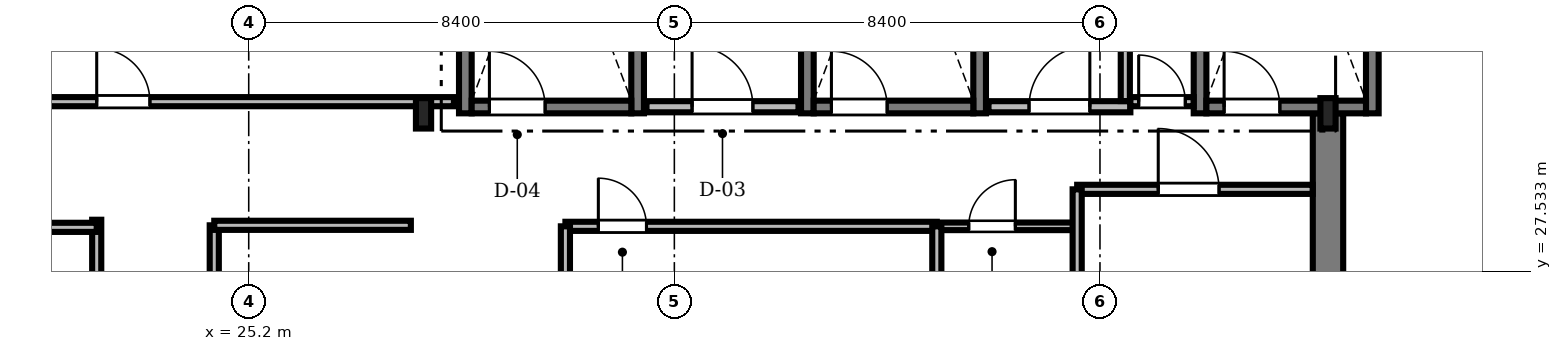
"""IFC4 building model, lengths in metres.
Left out: names, types, materials, properties, quantities, classifications, styles, units other than length and angle.
Written with IfcOpenShell. Run it as: python <this file> out.ifc"""

import sys

from ifc_helpers import new_model, si_unit, direction, frame, frame_2d, origin, origin_2d, place, context, subcontext, project, spatial, rectangle, i_section, extrude, source, transform, mapped, element, fill, save


model = new_model("IFC4")
c1 = context("Model", 3, precision=1e-05, world=origin(), true_north=direction((0.0, 1.0)))
c2 = subcontext(c1, "Body", "Model", "MODEL_VIEW")
j1 = project(units=[si_unit("LENGTHUNIT", "METRE"), si_unit("PLANEANGLEUNIT", "RADIAN")], contexts=[c1])
p1 = place(None, origin())
s1 = spatial("IfcSite", under=j1, at=p1, CompositionType="ELEMENT")
p2 = place(p1, origin())
s2 = spatial("IfcBuilding", under=s1, at=p2, CompositionType="ELEMENT")
p3 = place(p2, frame((0.0, 0.0, 246.65)))
s3 = spatial("IfcBuildingStorey", under=s2, at=p3, CompositionType="ELEMENT", Elevation=246.65)
m1 = source(origin(), c2, "Body", "SweptSolid", [
    extrude(rectangle(XDim=13.15, YDim=0.6, at=frame_2d((6.575, 0.0))), origin(), (0.0, 0.0, 1.0), 3.73),
])
p4 = place(p3, frame((46.5, 17.5, 0.0), z_axis=(0.0, 0.0, 1.0), x_axis=(0.0, 1.0, 0.0)))
e1 = element("IfcWall", 1, at=p4, inside=s3, PredefinedType="SHEAR", context=c2, shape_type="MappedRepresentation", body=[
    mapped(m1, transform((0.0, 0.0, 0.0), scale=1.0)),
])
m2 = source(origin(), c2, "Body", "SweptSolid", [
    extrude(i_section(OverallWidth=0.3, OverallDepth=0.6, WebThickness=0.015, FlangeThickness=0.03, FilletRadius=0.027, at=origin_2d()), origin(), (0.0, 0.0, 1.0), 3.73),
])
for number, where, z_axis, x_axis in (
    (2, (28.65, 30.65, 0.0), (0.0, 0.0, 1.0), (1.0, 0.0, 0.0)),
    (3, (46.5, 30.65, 0.0), (0.0, 0.0, 1.0), (1.0, 0.0, 0.0)),
):
    element("IfcColumn", number, at=place(p3, frame(where, z_axis=z_axis, x_axis=x_axis)), inside=s3, PredefinedType="COLUMN", context=c2, shape_type="MappedRepresentation", body=[
        mapped(m2, transform((0.0, 0.0, 0.0), scale=1.0)),
    ])
m3 = source(origin(), c2, "Body", "SweptSolid", [
    extrude(rectangle(XDim=9.35, YDim=0.25, at=frame_2d((4.675, 0.0))), origin(), (0.0, 0.0, 1.0), 3.75),
])
for number, where, z_axis, x_axis in (
    (4, (29.475, 30.65, 0.0), (0.0, 0.0, 1.0), (0.0, 1.0, 0.0)),
    (5, (32.875, 30.65, 0.0), (0.0, 0.0, 1.0), (0.0, 1.0, 0.0)),
):
    element("IfcWall", number, at=place(p3, frame(where, z_axis=z_axis, x_axis=x_axis)), inside=s3, PredefinedType="SOLIDWALL", context=c2, shape_type="MappedRepresentation", body=[
        mapped(m3, transform((0.0, 0.0, 0.0), scale=1.0)),
    ])
m4 = source(origin(), c2, "Body", "SweptSolid", [
    extrude(rectangle(XDim=3.15, YDim=0.25, at=frame_2d((1.575, 0.0))), origin(), (0.0, 0.0, 1.0), 3.75),
])
p5 = place(p3, frame((29.6, 30.775, 0.0), z_axis=(0.0, 0.0, 1.0), x_axis=(1.0, 0.0, 0.0)))
e6 = element("IfcWall", 6, at=p5, inside=s3, PredefinedType="SOLIDWALL", context=c2, shape_type="MappedRepresentation", body=[
    mapped(m4, transform((0.0, 0.0, 0.0), scale=1.0)),
])
m5 = source(origin(), c2, "Body", "SweptSolid", [
    extrude(rectangle(XDim=1.1, YDim=2.2, at=frame_2d((0.55, 1.1))), frame((0.0, 0.135, 0.0), z_axis=(0.0, -1.0, 0.0), x_axis=(1.0, 0.0, 0.0)), (0.0, 0.0, 1.0), 0.27),
])
p6 = place(p5, frame((0.35, 0.0, 0.0)))
e7 = element("IfcOpeningElement", 7, at=p6, cuts=e6, PredefinedType="OPENING", context=c2, shape_type="MappedRepresentation", body=[
    mapped(m5, transform((0.0, 0.0, 0.0), scale=1.0)),
])
for number, where, z_axis, x_axis in (
    (8, (36.225, 30.65, 0.0), (0.0, 0.0, 1.0), (0.0, 1.0, 0.0)),
    (9, (39.625, 30.65, 0.0), (0.0, 0.0, 1.0), (0.0, 1.0, 0.0)),
):
    element("IfcWall", number, at=place(p3, frame(where, z_axis=z_axis, x_axis=x_axis)), inside=s3, PredefinedType="SOLIDWALL", context=c2, shape_type="MappedRepresentation", body=[
        mapped(m3, transform((0.0, 0.0, 0.0), scale=1.0)),
    ])
p7 = place(p3, frame((36.35, 30.775, 0.0), z_axis=(0.0, 0.0, 1.0), x_axis=(1.0, 0.0, 0.0)))
e10 = element("IfcWall", 10, at=p7, inside=s3, PredefinedType="SOLIDWALL", context=c2, shape_type="MappedRepresentation", body=[
    mapped(m4, transform((0.0, 0.0, 0.0), scale=1.0)),
])
p8 = place(p7, frame((0.35, 0.0, 0.0)))
e11 = element("IfcOpeningElement", 11, at=p8, cuts=e10, PredefinedType="OPENING", context=c2, shape_type="MappedRepresentation", body=[
    mapped(m5, transform((0.0, 0.0, 0.0), scale=1.0)),
])
for number, where, z_axis, x_axis in (
    (12, (43.975, 30.65, 0.0), (0.0, 0.0, 1.0), (0.0, 1.0, 0.0)),
    (13, (47.375, 30.65, 0.0), (0.0, 0.0, 1.0), (0.0, 1.0, 0.0)),
):
    element("IfcWall", number, at=place(p3, frame(where, z_axis=z_axis, x_axis=x_axis)), inside=s3, PredefinedType="SOLIDWALL", context=c2, shape_type="MappedRepresentation", body=[
        mapped(m3, transform((0.0, 0.0, 0.0), scale=1.0)),
    ])
p9 = place(p3, frame((44.1, 30.775, 0.0), z_axis=(0.0, 0.0, 1.0), x_axis=(1.0, 0.0, 0.0)))
e14 = element("IfcWall", 14, at=p9, inside=s3, PredefinedType="SOLIDWALL", context=c2, shape_type="MappedRepresentation", body=[
    mapped(m4, transform((0.0, 0.0, 0.0), scale=1.0)),
])
p10 = place(p9, frame((0.35, 0.0, 0.0)))
e15 = element("IfcOpeningElement", 15, at=p10, cuts=e14, PredefinedType="OPENING", context=c2, shape_type="MappedRepresentation", body=[
    mapped(m5, transform((0.0, 0.0, 0.0), scale=1.0)),
])
m6 = source(origin(), c2, "Body", "SweptSolid", [
    extrude(rectangle(XDim=3.0, YDim=0.22, at=frame_2d((1.5, 0.0))), origin(), (0.0, 0.0, 1.0), 3.73),
])
p11 = place(p3, frame((33.05, 30.78, 0.0), z_axis=(0.0, 0.0, 1.0), x_axis=(1.0, 0.0, 0.0)))
e16 = element("IfcWall", 16, at=p11, inside=s3, PredefinedType="SOLIDWALL", context=c2, shape_type="MappedRepresentation", body=[
    mapped(m6, transform((0.0, 0.0, 0.0), scale=1.0)),
])
m7 = source(origin(), c2, "Body", "SweptSolid", [
    extrude(rectangle(XDim=1.2, YDim=2.2, at=frame_2d((0.6, 1.1))), frame((0.0, 0.12, 0.0), z_axis=(0.0, -1.0, 0.0), x_axis=(1.0, 0.0, 0.0)), (0.0, 0.0, 1.0), 0.24),
])
p12 = place(p11, frame((0.9, 0.0, 0.0)))
e17 = element("IfcOpeningElement", 17, at=p12, cuts=e16, PredefinedType="OPENING", context=c2, shape_type="MappedRepresentation", body=[
    mapped(m7, transform((0.0, 0.0, 0.0), scale=1.0)),
])
m8 = source(origin(), c2, "Body", "SweptSolid", [
    extrude(rectangle(XDim=2.8, YDim=0.22, at=frame_2d((1.4, 0.0))), origin(), (0.0, 0.0, 1.0), 3.73),
])
p13 = place(p3, frame((39.8, 30.78, 0.0), z_axis=(0.0, 0.0, 1.0), x_axis=(1.0, 0.0, 0.0)))
e18 = element("IfcWall", 18, at=p13, inside=s3, PredefinedType="SOLIDWALL", context=c2, shape_type="MappedRepresentation", body=[
    mapped(m8, transform((0.0, 0.0, 0.0), scale=1.0)),
])
p14 = place(p13, frame((0.8, 0.0, 0.0)))
e19 = element("IfcOpeningElement", 19, at=p14, cuts=e18, PredefinedType="OPENING", context=c2, shape_type="MappedRepresentation", body=[
    mapped(m7, transform((0.0, 0.0, 0.0), scale=1.0)),
])
m9 = source(origin(), c2, "Body", "SweptSolid", [
    extrude(rectangle(XDim=13.328, YDim=0.18, at=frame_2d((6.664, 0.0))), origin(), (0.0, 0.0, 1.0), 2.972),
])
p15 = place(p3, frame((15.922, 30.88, 0.0), z_axis=(0.0, 0.0, 1.0), x_axis=(1.0, 0.0, 0.0)))
e20 = element("IfcWall", 20, at=p15, inside=s3, PredefinedType="PARTITIONING", context=c2, shape_type="MappedRepresentation", body=[
    mapped(m9, transform((0.0, 0.0, 0.0), scale=1.0)),
])
m10 = source(origin(), c2, "Body", "SweptSolid", [
    extrude(rectangle(XDim=1.05, YDim=2.2, at=frame_2d((0.525, 1.1))), frame((0.0, 0.1, 0.0), z_axis=(0.0, -1.0, 0.0), x_axis=(1.0, 0.0, 0.0)), (0.0, 0.0, 1.0), 0.2),
])
p16 = place(p15, frame((6.278, 0.0, 0.0)))
e21 = element("IfcOpeningElement", 21, at=p16, cuts=e20, PredefinedType="OPENING", context=c2, shape_type="MappedRepresentation", body=[
    mapped(m10, transform((0.0, 0.0, 0.0), scale=1.0)),
])
m11 = source(origin(), c2, "Body", "SweptSolid", [
    extrude(rectangle(XDim=11.94, YDim=0.18, at=frame_2d((5.97, 0.0))), origin(), (0.0, 0.0, 1.0), 3.172),
])
p17 = place(p3, frame((24.52, 16.5, 0.0), z_axis=(0.0, 0.0, 1.0), x_axis=(0.0, 1.0, 0.0)))
e22 = element("IfcWall", 22, at=p17, inside=s3, PredefinedType="PARTITIONING", context=c2, shape_type="MappedRepresentation", body=[
    mapped(m11, transform((0.0, 0.0, 0.0), scale=1.0)),
])
p18 = place(p17, frame((4.5, 0.0, 0.0)))
e23 = element("IfcOpeningElement", 23, at=p18, cuts=e22, PredefinedType="OPENING", context=c2, shape_type="MappedRepresentation", body=[
    mapped(m10, transform((0.0, 0.0, 0.0), scale=1.0)),
])
m12 = source(origin(), c2, "Body", "SweptSolid", [
    extrude(rectangle(XDim=7.33, YDim=0.18, at=frame_2d((3.665, 0.0))), origin(), (0.0, 0.0, 1.0), 3.362),
])
p19 = place(p3, frame((31.45, 28.42, 0.0), z_axis=(0.0, 0.0, 1.0), x_axis=(1.0, 0.0, 0.0)))
e24 = element("IfcWall", 24, at=p19, inside=s3, PredefinedType="PARTITIONING", context=c2, shape_type="MappedRepresentation", body=[
    mapped(m12, transform((0.0, 0.0, 0.0), scale=1.0)),
])
m13 = source(origin(), c2, "Body", "SweptSolid", [
    extrude(rectangle(XDim=0.95, YDim=2.15, at=frame_2d((0.475, 1.075))), frame((0.0, 0.1, 0.0), z_axis=(0.0, -1.0, 0.0), x_axis=(1.0, 0.0, 0.0)), (0.0, 0.0, 1.0), 0.2),
])
p20 = place(p19, frame((0.65, 0.0, 0.0)))
e25 = element("IfcOpeningElement", 25, at=p20, cuts=e24, PredefinedType="OPENING", context=c2, shape_type="MappedRepresentation", body=[
    mapped(m13, transform((0.0, 0.0, 0.0), scale=1.0)),
])
m14 = source(origin(), c2, "Body", "SweptSolid", [
    extrude(rectangle(XDim=4.648, YDim=0.18, at=frame_2d((2.324, 0.0))), origin(), (0.0, 0.0, 1.0), 3.362),
])
p21 = place(p3, frame((41.55, 29.15, 0.0), z_axis=(0.0, 0.0, 1.0), x_axis=(1.0, 0.0, 0.0)))
e26 = element("IfcWall", 26, at=p21, inside=s3, PredefinedType="PARTITIONING", context=c2, shape_type="MappedRepresentation", body=[
    mapped(m14, transform((0.0, 0.0, 0.0), scale=1.0)),
])
m15 = source(origin(), c2, "Body", "SweptSolid", [
    extrude(rectangle(XDim=1.2, YDim=2.2, at=frame_2d((0.6, 1.1))), frame((0.0, 0.1, 0.0), z_axis=(0.0, -1.0, 0.0), x_axis=(1.0, 0.0, 0.0)), (0.0, 0.0, 1.0), 0.2),
])
p22 = place(p21, frame((1.6, 0.0, 0.0)))
e27 = element("IfcOpeningElement", 27, at=p22, cuts=e26, PredefinedType="OPENING", context=c2, shape_type="MappedRepresentation", body=[
    mapped(m15, transform((0.0, 0.0, 0.0), scale=1.0)),
])
m16 = source(origin(), c2, "Body", "SweptSolid", [
    extrude(rectangle(XDim=2.74, YDim=0.15, at=frame_2d((1.37, 0.0))), origin(), (0.0, 0.0, 1.0), 3.73),
])
p23 = place(p3, frame((38.78, 28.42, 0.0), z_axis=(0.0, 0.0, 1.0), x_axis=(1.0, 0.0, 0.0)))
e28 = element("IfcWall", 28, at=p23, inside=s3, PredefinedType="PARTITIONING", context=c2, shape_type="MappedRepresentation", body=[
    mapped(m16, transform((0.0, 0.0, 0.0), scale=1.0)),
])
m17 = source(origin(), c2, "Body", "SweptSolid", [
    extrude(rectangle(XDim=0.92, YDim=2.1, at=frame_2d((0.46, 1.05))), frame((0.0, 0.085, 0.0), z_axis=(0.0, -1.0, 0.0), x_axis=(1.0, 0.0, 0.0)), (0.0, 0.0, 1.0), 0.17),
])
p24 = place(p23, frame((0.63, 0.0, 0.0)))
e29 = element("IfcOpeningElement", 29, at=p24, cuts=e28, PredefinedType="OPENING", context=c2, shape_type="MappedRepresentation", body=[
    mapped(m17, transform((0.0, 0.0, 0.0), scale=1.0)),
])
m18 = source(origin(), c2, "Body", "SweptSolid", [
    extrude(rectangle(XDim=1.248, YDim=0.18, at=frame_2d((0.624, 0.0))), origin(), (0.0, 0.0, 1.0), 3.73),
])
p25 = place(p3, frame((42.6, 30.88, 0.0), z_axis=(0.0, 0.0, 1.0), x_axis=(1.0, 0.0, 0.0)))
e30 = element("IfcWall", 30, at=p25, inside=s3, PredefinedType="PARTITIONING", context=c2, shape_type="MappedRepresentation", body=[
    mapped(m18, transform((0.0, 0.0, 0.0), scale=1.0)),
])
m19 = source(origin(), c2, "Body", "SweptSolid", [
    extrude(rectangle(XDim=0.92, YDim=2.1, at=frame_2d((0.46, 1.05))), frame((0.0, 0.1, 0.0), z_axis=(0.0, -1.0, 0.0), x_axis=(1.0, 0.0, 0.0)), (0.0, 0.0, 1.0), 0.2),
])
p26 = place(p25, frame((0.164, 0.0, 0.0)))
e31 = element("IfcOpeningElement", 31, at=p26, cuts=e30, PredefinedType="OPENING", context=c2, shape_type="MappedRepresentation", body=[
    mapped(m19, transform((0.0, 0.0, 0.0), scale=1.0)),
])
m20 = source(origin(), c2, "Body", "SweptSolid", [
    extrude(rectangle(XDim=15.04, YDim=0.18, at=frame_2d((7.52, 0.0))), origin(), (0.0, 0.0, 1.0), 3.172),
])
p27 = place(p3, frame((22.2, 13.51, 0.0), z_axis=(0.0, 0.0, 1.0), x_axis=(0.0, 1.0, 0.0)))
e32 = element("IfcWall", 32, at=p27, inside=s3, PredefinedType="PARTITIONING", context=c2, shape_type="MappedRepresentation", body=[
    mapped(m20, transform((0.0, 0.0, 0.0), scale=1.0)),
])
m21 = source(origin(), c2, "Body", "SweptSolid", [
    extrude(rectangle(XDim=6.47, YDim=0.18, at=frame_2d((3.235, 0.0))), origin(), (0.0, 0.0, 1.0), 2.972),
])
p28 = place(p3, frame((15.73, 28.4, 0.0), z_axis=(0.0, 0.0, 1.0), x_axis=(1.0, 0.0, 0.0)))
e33 = element("IfcWall", 33, at=p28, inside=s3, PredefinedType="PARTITIONING", context=c2, shape_type="MappedRepresentation", body=[
    mapped(m21, transform((0.0, 0.0, 0.0), scale=1.0)),
])
m22 = source(origin(), c2, "Body", "SweptSolid", [
    extrude(rectangle(XDim=3.88, YDim=0.18, at=frame_2d((1.94, 0.0))), origin(), (0.0, 0.0, 1.0), 3.73),
])
p29 = place(p3, frame((24.52, 28.44, 0.0), z_axis=(0.0, 0.0, 1.0), x_axis=(1.0, 0.0, 0.0)))
e34 = element("IfcWall", 34, at=p29, inside=s3, PredefinedType="PARTITIONING", context=c2, shape_type="MappedRepresentation", body=[
    mapped(m22, transform((0.0, 0.0, 0.0), scale=1.0)),
])
m23 = source(origin(), c2, "Body", "SweptSolid", [
    extrude(rectangle(XDim=2.758, YDim=0.18, at=frame_2d((1.379, 0.0))), origin(), (0.0, 0.0, 1.0), 3.73),
])
p30 = place(p3, frame((42.5, 30.892, 0.0), z_axis=(0.0, 0.0, 1.0), x_axis=(0.0, 1.0, 0.0)))
e35 = element("IfcWall", 35, at=p30, inside=s3, PredefinedType="PARTITIONING", context=c2, shape_type="MappedRepresentation", body=[
    mapped(m23, transform((0.0, 0.0, 0.0), scale=1.0)),
])
m24 = source(origin(), c2, "Body", "SweptSolid", [
    extrude(rectangle(XDim=2.35, YDim=0.18, at=frame_2d((1.175, 0.0))), origin(), (0.0, 0.0, 1.0), 3.362),
])
p31 = place(p3, frame((41.55, 26.8, 0.0), z_axis=(0.0, 0.0, 1.0), x_axis=(0.0, 1.0, 0.0)))
e36 = element("IfcWall", 36, at=p31, inside=s3, PredefinedType="PARTITIONING", context=c2, shape_type="MappedRepresentation", body=[
    mapped(m24, transform((0.0, 0.0, 0.0), scale=1.0)),
])
m25 = source(origin(), c2, "Body", "SweptSolid", [
    extrude(rectangle(XDim=1.6, YDim=0.18, at=frame_2d((0.8, 0.0))), origin(), (0.0, 0.0, 1.0), 3.272),
])
for number, where, z_axis, x_axis in (
    (37, (31.45, 26.82, 0.0), (0.0, 0.0, 1.0), (0.0, 1.0, 0.0)),
    (38, (38.78, 26.82, 0.0), (0.0, 0.0, 1.0), (0.0, 1.0, 0.0)),
):
    element("IfcWall", number, at=place(p3, frame(where, z_axis=z_axis, x_axis=x_axis)), inside=s3, PredefinedType="PARTITIONING", context=c2, shape_type="MappedRepresentation", body=[
        mapped(m25, transform((0.0, 0.0, 0.0), scale=1.0)),
    ])
m26 = source(origin(), c2, "Body", "SweptSolid", [
    extrude(rectangle(XDim=1.1, YDim=2.2, at=frame_2d((0.55, 1.1))), frame((0.0, 0.025, 0.0), z_axis=(0.0, -1.0, 0.0), x_axis=(1.0, 0.0, 0.0)), (0.0, 0.0, 1.0), 0.05),
])
p32 = place(p6, origin())
e39 = element("IfcDoor", 39, at=p32, inside=s3, OperationType="SINGLE_SWING_LEFT", PredefinedType="DOOR", context=c2, shape_type="MappedRepresentation", body=[
    mapped(m26, transform((0.0, 0.0, 0.0), scale=1.0)),
])
fill(e7, e39)
p33 = place(p8, origin())
e40 = element("IfcDoor", 40, at=p33, inside=s3, OperationType="SINGLE_SWING_LEFT", PredefinedType="DOOR", context=c2, shape_type="MappedRepresentation", body=[
    mapped(m26, transform((0.0, 0.0, 0.0), scale=1.0)),
])
fill(e11, e40)
p34 = place(p10, origin())
e41 = element("IfcDoor", 41, at=p34, inside=s3, OperationType="SINGLE_SWING_LEFT", PredefinedType="DOOR", context=c2, shape_type="MappedRepresentation", body=[
    mapped(m26, transform((0.0, 0.0, 0.0), scale=1.0)),
])
fill(e15, e41)
m27 = source(origin(), c2, "Body", "SweptSolid", [
    extrude(rectangle(XDim=1.2, YDim=2.2, at=frame_2d((0.6, 1.1))), frame((0.0, 0.025, 0.0), z_axis=(0.0, -1.0, 0.0), x_axis=(1.0, 0.0, 0.0)), (0.0, 0.0, 1.0), 0.05),
])
p35 = place(p12, origin())
e42 = element("IfcDoor", 42, at=p35, inside=s3, OperationType="SINGLE_SWING_LEFT", PredefinedType="DOOR", context=c2, shape_type="MappedRepresentation", body=[
    mapped(m27, transform((0.0, 0.0, 0.0), scale=1.0)),
])
fill(e17, e42)
p36 = place(p14, origin())
e43 = element("IfcDoor", 43, at=p36, inside=s3, OperationType="SINGLE_SWING_RIGHT", PredefinedType="DOOR", context=c2, shape_type="MappedRepresentation", body=[
    mapped(m27, transform((0.0, 0.0, 0.0), scale=1.0)),
])
fill(e19, e43)
m28 = source(origin(), c2, "Body", "SweptSolid", [
    extrude(rectangle(XDim=1.05, YDim=2.2, at=frame_2d((0.525, 1.1))), frame((0.0, 0.025, 0.0), z_axis=(0.0, -1.0, 0.0), x_axis=(1.0, 0.0, 0.0)), (0.0, 0.0, 1.0), 0.05),
])
p37 = place(p16, origin())
e44 = element("IfcDoor", 44, at=p37, inside=s3, OperationType="SINGLE_SWING_LEFT", PredefinedType="DOOR", context=c2, shape_type="MappedRepresentation", body=[
    mapped(m28, transform((0.0, 0.0, 0.0), scale=1.0)),
])
fill(e21, e44)
m29 = source(origin(), c2, "Body", "SweptSolid", [
    extrude(rectangle(XDim=0.95, YDim=2.15, at=frame_2d((0.475, 1.075))), frame((0.0, 0.025, 0.0), z_axis=(0.0, -1.0, 0.0), x_axis=(1.0, 0.0, 0.0)), (0.0, 0.0, 1.0), 0.05),
])
p38 = place(p20, origin())
e45 = element("IfcDoor", 45, at=p38, inside=s3, OperationType="SINGLE_SWING_LEFT", PredefinedType="DOOR", context=c2, shape_type="MappedRepresentation", body=[
    mapped(m29, transform((0.0, 0.0, 0.0), scale=1.0)),
])
fill(e25, e45)
p39 = place(p22, origin())
e46 = element("IfcDoor", 46, at=p39, inside=s3, OperationType="SINGLE_SWING_LEFT", PredefinedType="DOOR", context=c2, shape_type="MappedRepresentation", body=[
    mapped(m27, transform((0.0, 0.0, 0.0), scale=1.0)),
])
fill(e27, e46)
m30 = source(origin(), c2, "Body", "SweptSolid", [
    extrude(rectangle(XDim=0.92, YDim=2.1, at=frame_2d((0.46, 1.05))), frame((0.0, 0.025, 0.0), z_axis=(0.0, -1.0, 0.0), x_axis=(1.0, 0.0, 0.0)), (0.0, 0.0, 1.0), 0.05),
])
p40 = place(p24, origin())
e47 = element("IfcDoor", 47, at=p40, inside=s3, OperationType="SINGLE_SWING_RIGHT", PredefinedType="DOOR", context=c2, shape_type="MappedRepresentation", body=[
    mapped(m30, transform((0.0, 0.0, 0.0), scale=1.0)),
])
fill(e29, e47)
p41 = place(p26, origin())
e48 = element("IfcDoor", 48, at=p41, inside=s3, OperationType="SINGLE_SWING_LEFT", PredefinedType="DOOR", context=c2, shape_type="MappedRepresentation", body=[
    mapped(m30, transform((0.0, 0.0, 0.0), scale=1.0)),
])
fill(e31, e48)
save(model, sys.argv[1])
